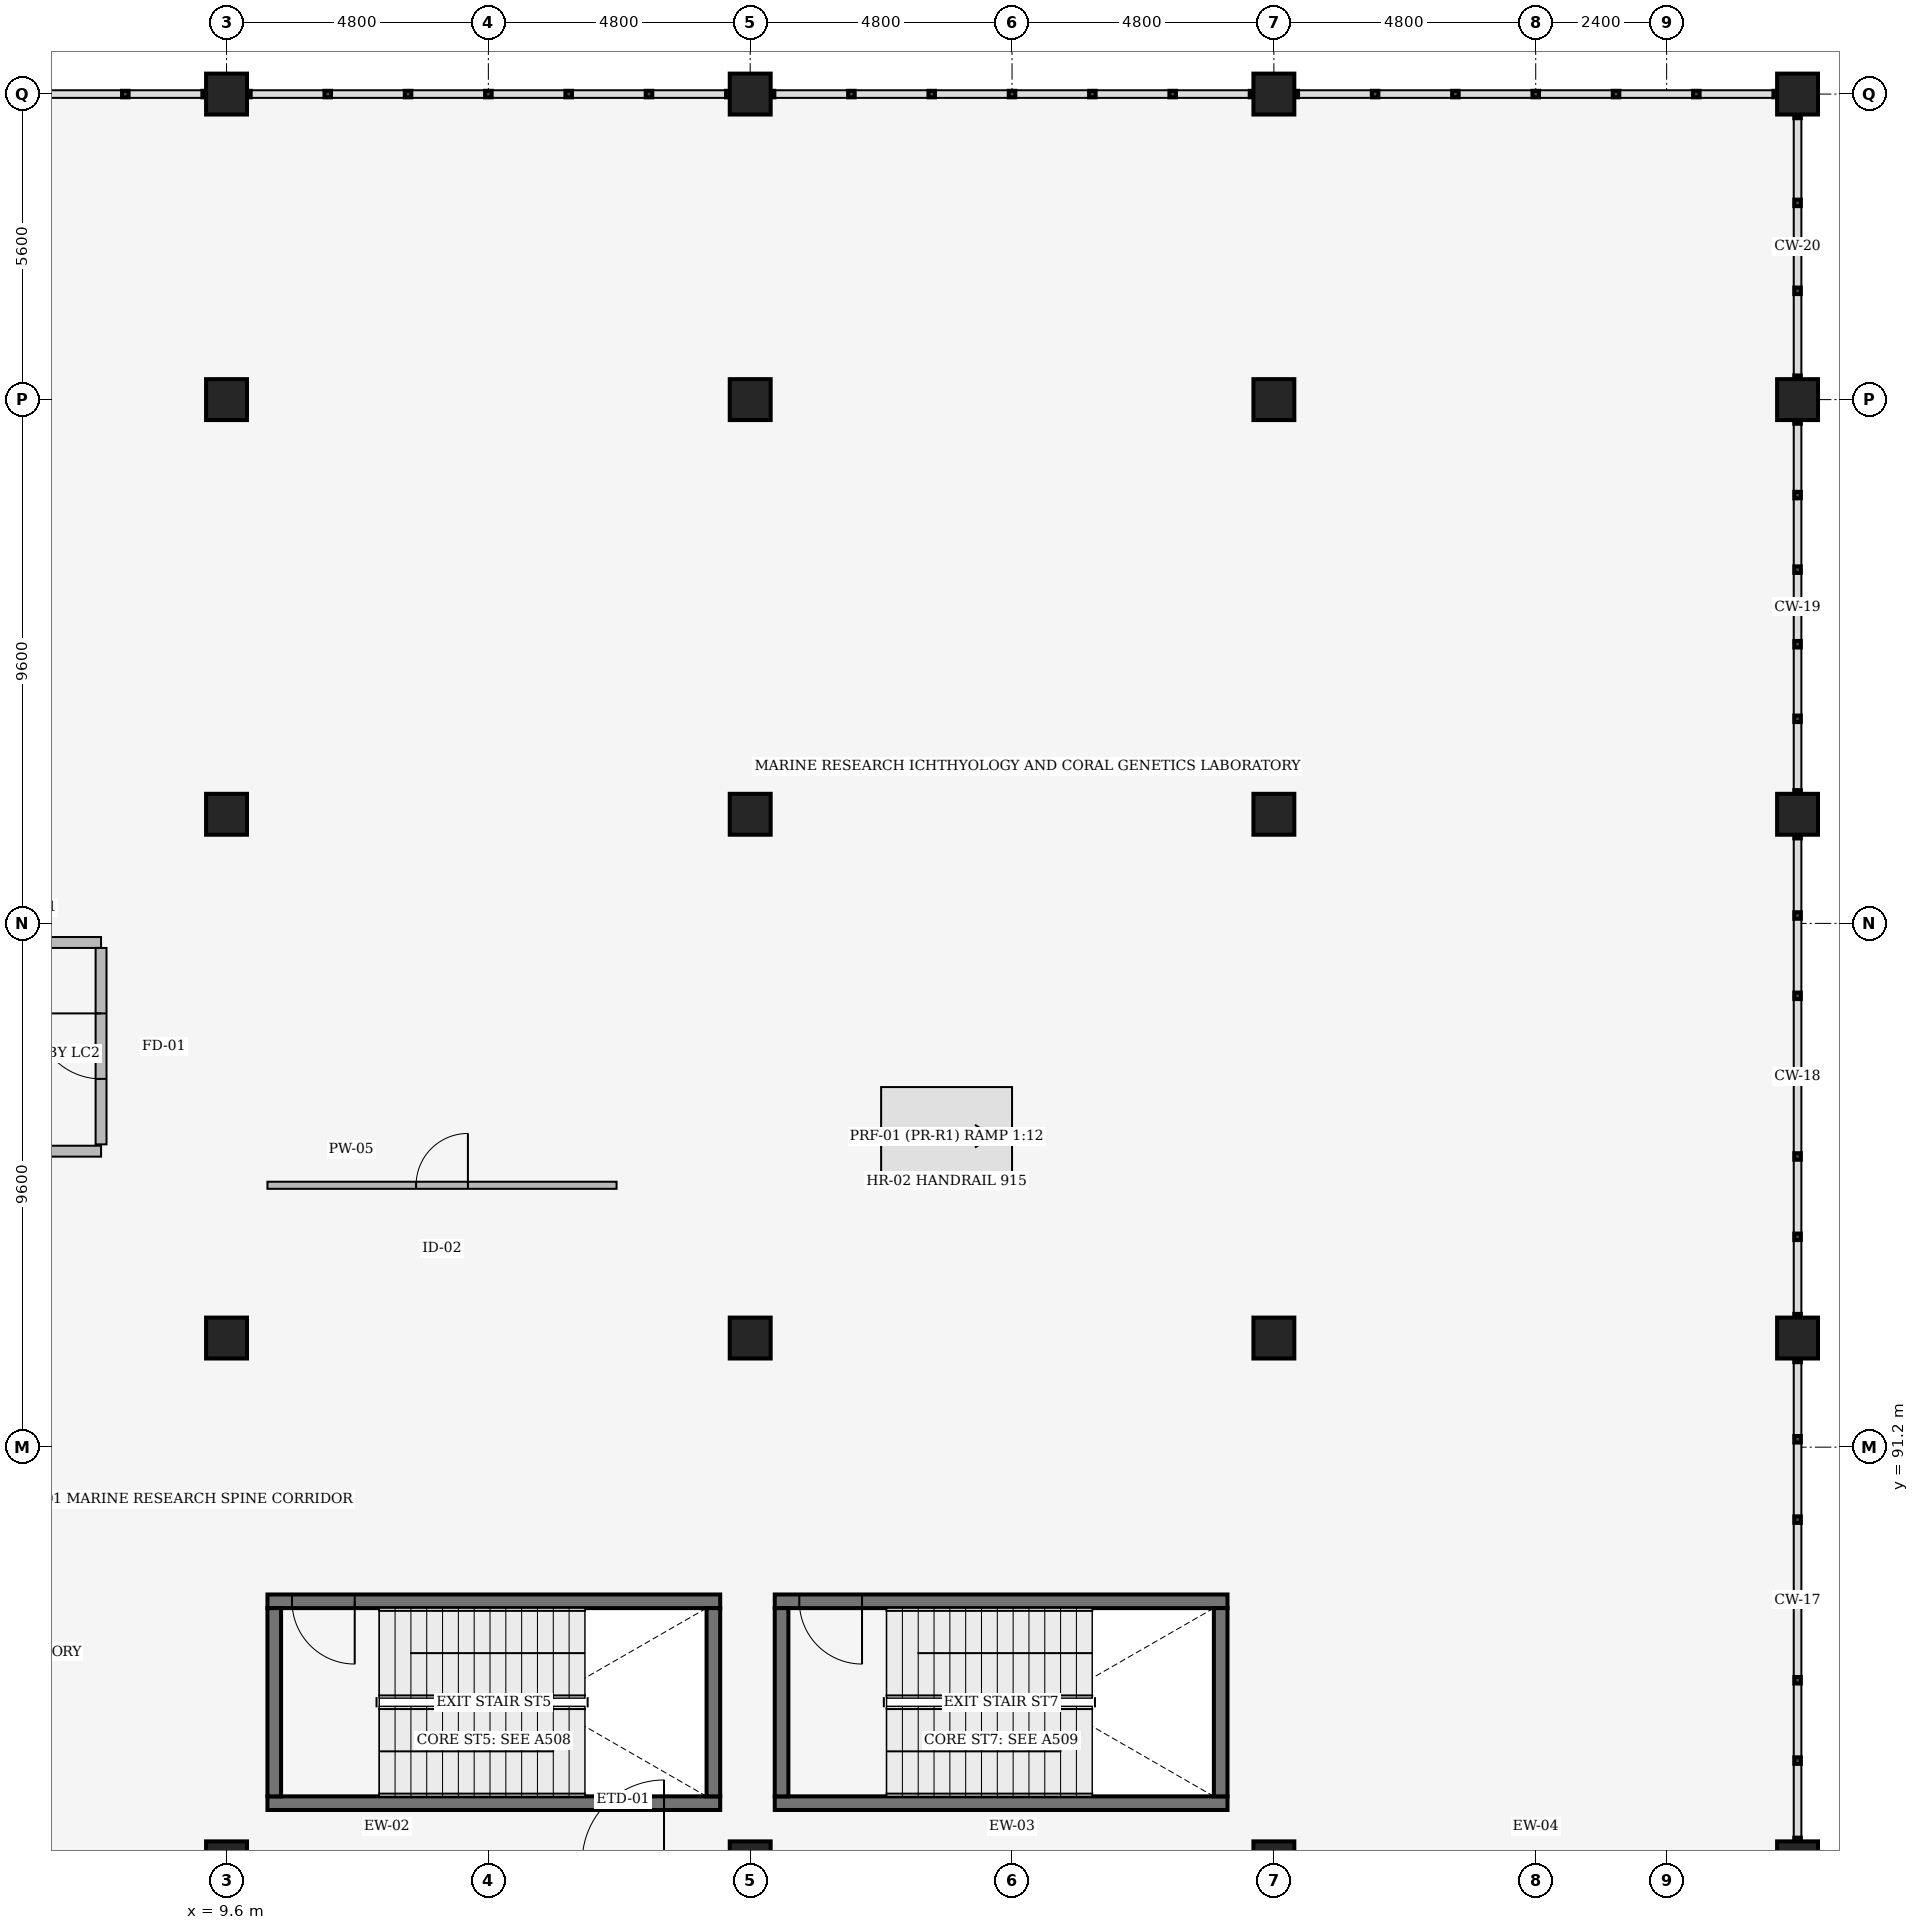
"""IFC4 building model, lengths in metres.
Left out: names, types, materials, properties, quantities, classifications, styles, units other than length and angle.
Written with IfcOpenShell. Run it as: python <this file> out.ifc"""

import sys

from ifc_helpers import new_model, si_unit, direction, frame, frame_2d, origin, origin_2d, place, context, subcontext, project, spatial, rectangle, extrude, element, fill, save


model = new_model("IFC4")
c1 = context("Model", 3, precision=1e-05, world=origin(), true_north=direction((0.0, 1.0)))
c2 = subcontext(c1, "Body", "Model", "MODEL_VIEW")
j1 = project(units=[si_unit("LENGTHUNIT", "METRE"), si_unit("PLANEANGLEUNIT", "RADIAN")], contexts=[c1])
p1 = place(None, origin())
s1 = spatial("IfcSite", under=j1, at=p1, CompositionType="ELEMENT")
p2 = place(p1, origin())
s2 = spatial("IfcBuilding", under=s1, at=p2, CompositionType="ELEMENT")
p3 = place(p2, frame((0.0, 0.0, 5.4)))
s3 = spatial("IfcBuildingStorey", under=s2, at=p3, CompositionType="ELEMENT", Elevation=5.4)
for number, where, z_axis, x_axis in (
    (1, (9.6, 83.6, 0.0), (0.0, 0.0, 1.0), (1.0, 0.0, 0.0)),
    (2, (9.6, 93.2, 0.0), (0.0, 0.0, 1.0), (1.0, 0.0, 0.0)),
    (3, (9.6, 102.8, 0.0), (0.0, 0.0, 1.0), (1.0, 0.0, 0.0)),
    (4, (9.6, 110.4, 0.0), (0.0, 0.0, 1.0), (1.0, 0.0, 0.0)),
    (5, (9.6, 116.0, 0.0), (0.0, 0.0, 1.0), (1.0, 0.0, 0.0)),
    (6, (19.2, 83.6, 0.0), (0.0, 0.0, 1.0), (1.0, 0.0, 0.0)),
    (7, (19.2, 93.2, 0.0), (0.0, 0.0, 1.0), (1.0, 0.0, 0.0)),
    (8, (19.2, 102.8, 0.0), (0.0, 0.0, 1.0), (1.0, 0.0, 0.0)),
    (9, (19.2, 110.4, 0.0), (0.0, 0.0, 1.0), (1.0, 0.0, 0.0)),
    (10, (19.2, 116.0, 0.0), (0.0, 0.0, 1.0), (1.0, 0.0, 0.0)),
    (11, (28.8, 83.6, 0.0), (0.0, 0.0, 1.0), (1.0, 0.0, 0.0)),
    (12, (28.8, 93.2, 0.0), (0.0, 0.0, 1.0), (1.0, 0.0, 0.0)),
    (13, (28.8, 102.8, 0.0), (0.0, 0.0, 1.0), (1.0, 0.0, 0.0)),
    (14, (28.8, 110.4, 0.0), (0.0, 0.0, 1.0), (1.0, 0.0, 0.0)),
    (15, (28.8, 116.0, 0.0), (0.0, 0.0, 1.0), (1.0, 0.0, 0.0)),
    (16, (38.4, 83.6, 0.0), (0.0, 0.0, 1.0), (1.0, 0.0, 0.0)),
    (17, (38.4, 93.2, 0.0), (0.0, 0.0, 1.0), (1.0, 0.0, 0.0)),
    (18, (38.4, 102.8, 0.0), (0.0, 0.0, 1.0), (1.0, 0.0, 0.0)),
    (19, (38.4, 110.4, 0.0), (0.0, 0.0, 1.0), (1.0, 0.0, 0.0)),
    (20, (38.4, 116.0, 0.0), (0.0, 0.0, 1.0), (1.0, 0.0, 0.0)),
):
    element("IfcColumn", number, at=place(p3, frame(where, z_axis=z_axis, x_axis=x_axis)), inside=s3, PredefinedType="COLUMN", context=c2, shape_type="SweptSolid", body=[
        extrude(rectangle(XDim=0.75, YDim=0.75, at=origin_2d()), origin(), (0.0, 0.0, 1.0), 5.1),
    ])
p4 = place(p3, frame((10.35, 84.675, 0.0), z_axis=(0.0, 0.0, 1.0), x_axis=(1.0, 0.0, 0.0)))
e21 = element("IfcWall", 21, at=p4, inside=s3, PredefinedType="SHEAR", context=c2, shape_type="SweptSolid", body=[
    extrude(rectangle(XDim=8.3, YDim=0.25, at=frame_2d((4.15, 0.0))), origin(), (0.0, 0.0, 1.0), 4.8),
])
p5 = place(p3, frame((18.65, 88.375, 0.0), z_axis=(0.0, 0.0, 1.0), x_axis=(-1.0, 0.0, 0.0)))
e22 = element("IfcWall", 22, at=p5, inside=s3, PredefinedType="SHEAR", context=c2, shape_type="SweptSolid", body=[
    extrude(rectangle(XDim=8.3, YDim=0.25, at=frame_2d((4.15, 0.0))), origin(), (0.0, 0.0, 1.0), 4.8),
])
p6 = place(p5, frame((7.85, 0.0, 0.0), z_axis=(0.0, 0.0, 1.0), x_axis=(-1.0, 0.0, 0.0)))
e23 = element("IfcOpeningElement", 23, at=p6, cuts=e22, PredefinedType="OPENING", context=c2, shape_type="SweptSolid", body=[
    extrude(rectangle(XDim=1.15, YDim=2.2, at=frame_2d((0.575, 1.1))), frame((0.0, 0.135, 0.0), z_axis=(0.0, -1.0, 0.0), x_axis=(1.0, 0.0, 0.0)), (0.0, 0.0, 1.0), 0.27),
])
for number, where, z_axis, x_axis in (
    (24, (10.475, 88.25, 0.0), (0.0, 0.0, 1.0), (0.0, -1.0, 0.0)),
    (25, (18.525, 84.8, 0.0), (0.0, 0.0, 1.0), (0.0, 1.0, 0.0)),
):
    element("IfcWall", number, at=place(p3, frame(where, z_axis=z_axis, x_axis=x_axis)), inside=s3, PredefinedType="SHEAR", context=c2, shape_type="SweptSolid", body=[
        extrude(rectangle(XDim=3.45, YDim=0.25, at=frame_2d((1.725, 0.0))), origin(), (0.0, 0.0, 1.0), 4.8),
    ])
p7 = place(p3, frame((19.65, 84.675, 0.0), z_axis=(0.0, 0.0, 1.0), x_axis=(1.0, 0.0, 0.0)))
e26 = element("IfcWall", 26, at=p7, inside=s3, PredefinedType="SHEAR", context=c2, shape_type="SweptSolid", body=[
    extrude(rectangle(XDim=8.3, YDim=0.25, at=frame_2d((4.15, 0.0))), origin(), (0.0, 0.0, 1.0), 4.8),
])
p8 = place(p3, frame((27.95, 88.375, 0.0), z_axis=(0.0, 0.0, 1.0), x_axis=(-1.0, 0.0, 0.0)))
e27 = element("IfcWall", 27, at=p8, inside=s3, PredefinedType="SHEAR", context=c2, shape_type="SweptSolid", body=[
    extrude(rectangle(XDim=8.3, YDim=0.25, at=frame_2d((4.15, 0.0))), origin(), (0.0, 0.0, 1.0), 4.8),
])
p9 = place(p8, frame((7.85, 0.0, 0.0), z_axis=(0.0, 0.0, 1.0), x_axis=(-1.0, 0.0, 0.0)))
e28 = element("IfcOpeningElement", 28, at=p9, cuts=e27, PredefinedType="OPENING", context=c2, shape_type="SweptSolid", body=[
    extrude(rectangle(XDim=1.15, YDim=2.2, at=frame_2d((0.575, 1.1))), frame((0.0, 0.135, 0.0), z_axis=(0.0, -1.0, 0.0), x_axis=(1.0, 0.0, 0.0)), (0.0, 0.0, 1.0), 0.27),
])
for number, where, z_axis, x_axis in (
    (29, (19.775, 88.25, 0.0), (0.0, 0.0, 1.0), (0.0, -1.0, 0.0)),
    (30, (27.825, 84.8, 0.0), (0.0, 0.0, 1.0), (0.0, 1.0, 0.0)),
):
    element("IfcWall", number, at=place(p3, frame(where, z_axis=z_axis, x_axis=x_axis)), inside=s3, PredefinedType="SHEAR", context=c2, shape_type="SweptSolid", body=[
        extrude(rectangle(XDim=3.45, YDim=0.25, at=frame_2d((1.725, 0.0))), origin(), (0.0, 0.0, 1.0), 4.8),
    ])
p10 = place(p3, frame((2.1, 100.45, 0.0), z_axis=(0.0, 0.0, 1.0), x_axis=(1.0, 0.0, 0.0)))
e31 = element("IfcWall", 31, at=p10, inside=s3, PredefinedType="PARTITIONING", context=c2, shape_type="SweptSolid", body=[
    extrude(rectangle(XDim=5.2, YDim=0.2, at=frame_2d((2.6, 0.0))), origin(), (0.0, 0.0, 1.0), 4.349),
])
p11 = place(p10, frame((1.6, 0.0, 0.0)))
e32 = element("IfcOpeningElement", 32, at=p11, cuts=e31, PredefinedType="OPENING", context=c2, shape_type="SweptSolid", body=[
    extrude(rectangle(XDim=1.2, YDim=2.2, at=frame_2d((0.6, 1.1))), frame((0.0, 0.11, 0.0), z_axis=(0.0, -1.0, 0.0), x_axis=(1.0, 0.0, 0.0)), (0.0, 0.0, 1.0), 0.22),
])
p12 = place(p3, frame((7.3, 96.75, 0.0), z_axis=(0.0, 0.0, 1.0), x_axis=(0.0, 1.0, 0.0)))
e33 = element("IfcWall", 33, at=p12, inside=s3, PredefinedType="PARTITIONING", context=c2, shape_type="SweptSolid", body=[
    extrude(rectangle(XDim=3.6, YDim=0.2, at=frame_2d((1.8, 0.0))), origin(), (0.0, 0.0, 1.0), 4.349),
])
p13 = place(p12, frame((1.2, 0.0, 0.0)))
e34 = element("IfcOpeningElement", 34, at=p13, cuts=e33, PredefinedType="OPENING", context=c2, shape_type="SweptSolid", body=[
    extrude(rectangle(XDim=1.2, YDim=2.2, at=frame_2d((0.6, 1.1))), frame((0.0, 0.11, 0.0), z_axis=(0.0, -1.0, 0.0), x_axis=(1.0, 0.0, 0.0)), (0.0, 0.0, 1.0), 0.22),
])
p14 = place(p3, frame((5.25, 96.625, 0.0), z_axis=(0.0, 0.0, 1.0), x_axis=(1.0, 0.0, 0.0)))
e35 = element("IfcWall", 35, at=p14, inside=s3, PredefinedType="PARTITIONING", context=c2, shape_type="SweptSolid", body=[
    extrude(rectangle(XDim=2.05, YDim=0.2, at=frame_2d((1.025, 0.0))), origin(), (0.0, 0.0, 1.0), 4.74),
])
p15 = place(p3, frame((10.35, 96.0, 0.0), z_axis=(0.0, 0.0, 1.0), x_axis=(1.0, 0.0, 0.0)))
e36 = element("IfcWall", 36, at=p15, inside=s3, PredefinedType="PARTITIONING", context=c2, shape_type="SweptSolid", body=[
    extrude(rectangle(XDim=6.4, YDim=0.13, at=frame_2d((3.2, 0.0))), origin(), (0.0, 0.0, 1.0), 4.413),
])
p16 = place(p15, frame((2.725, 0.0, 0.0)))
e37 = element("IfcOpeningElement", 37, at=p16, cuts=e36, PredefinedType="OPENING", context=c2, shape_type="SweptSolid", body=[
    extrude(rectangle(XDim=0.95, YDim=2.15, at=frame_2d((0.475, 1.075))), frame((0.0, 0.075, 0.0), z_axis=(0.0, -1.0, 0.0), x_axis=(1.0, 0.0, 0.0)), (0.0, 0.0, 1.0), 0.15),
])
p17 = place(p6, origin())
e38 = element("IfcDoor", 38, at=p17, inside=s3, OperationType="SINGLE_SWING_RIGHT", PredefinedType="DOOR", context=c2, shape_type="SweptSolid", body=[
    extrude(rectangle(XDim=1.15, YDim=2.2, at=frame_2d((0.575, 1.1))), frame((0.0, 0.025, 0.0), z_axis=(0.0, -1.0, 0.0), x_axis=(1.0, 0.0, 0.0)), (0.0, 0.0, 1.0), 0.05),
])
fill(e23, e38)
p18 = place(p9, origin())
e39 = element("IfcDoor", 39, at=p18, inside=s3, OperationType="SINGLE_SWING_RIGHT", PredefinedType="DOOR", context=c2, shape_type="SweptSolid", body=[
    extrude(rectangle(XDim=1.15, YDim=2.2, at=frame_2d((0.575, 1.1))), frame((0.0, 0.025, 0.0), z_axis=(0.0, -1.0, 0.0), x_axis=(1.0, 0.0, 0.0)), (0.0, 0.0, 1.0), 0.05),
])
fill(e28, e39)
p19 = place(p13, origin())
e40 = element("IfcDoor", 40, at=p19, inside=s3, OperationType="SINGLE_SWING_RIGHT", PredefinedType="DOOR", context=c2, shape_type="SweptSolid", body=[
    extrude(rectangle(XDim=1.2, YDim=2.2, at=frame_2d((0.6, 1.1))), frame((0.0, 0.025, 0.0), z_axis=(0.0, -1.0, 0.0), x_axis=(1.0, 0.0, 0.0)), (0.0, 0.0, 1.0), 0.05),
])
fill(e34, e40)
p20 = place(p16, origin())
e41 = element("IfcDoor", 41, at=p20, inside=s3, OperationType="SINGLE_SWING_RIGHT", PredefinedType="DOOR", context=c2, shape_type="SweptSolid", body=[
    extrude(rectangle(XDim=0.95, YDim=2.15, at=frame_2d((0.475, 1.075))), frame((0.0, 0.025, 0.0), z_axis=(0.0, -1.0, 0.0), x_axis=(1.0, 0.0, 0.0)), (0.0, 0.0, 1.0), 0.05),
])
fill(e37, e41)
save(model, sys.argv[1])
